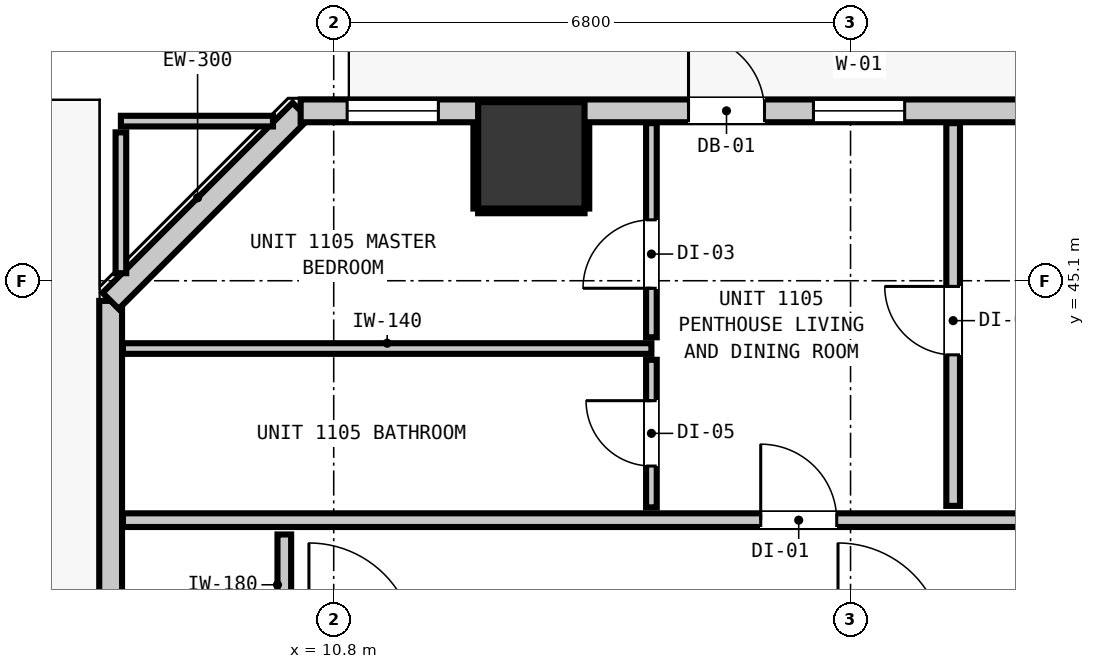
"""IFC4 building model, lengths in metres.
Left out: names, types, materials, properties, quantities, classifications, styles, units other than length and angle.
Written with IfcOpenShell. Run it as: python <this file> out.ifc"""

import sys

from ifc_helpers import new_model, si_unit, direction, frame, frame_2d, origin, origin_2d, place, context, subcontext, project, spatial, rectangle, extrude, element, fill, save


model = new_model("IFC4")
c1 = context("Model", 3, precision=1e-05, world=origin(), true_north=direction((0.0, 1.0)))
c2 = subcontext(c1, "Body", "Model", "MODEL_VIEW")
j1 = project(units=[si_unit("LENGTHUNIT", "METRE"), si_unit("PLANEANGLEUNIT", "RADIAN")], contexts=[c1])
p1 = place(None, origin())
s1 = spatial("IfcSite", under=j1, at=p1, CompositionType="ELEMENT")
p2 = place(p1, origin())
s2 = spatial("IfcBuilding", under=s1, at=p2, CompositionType="ELEMENT")
p3 = place(p2, frame((0.0, 0.0, 41.92)))
s3 = spatial("IfcBuildingStorey", under=s2, at=p3, CompositionType="ELEMENT", Elevation=41.92)
p4 = place(p3, frame((13.4, 46.75, -0.2), z_axis=(0.0, 0.0, 1.0), x_axis=(1.0, 0.0, 0.0)))
e1 = element("IfcColumn", 1, at=p4, inside=s3, PredefinedType="COLUMN", context=c2, shape_type="SweptSolid", body=[
    extrude(rectangle(XDim=1.4, YDim=1.4, at=origin_2d()), origin(), (0.0, 0.0, 1.0), 3.52),
])
p5 = place(p3, frame((7.865, 10.165, 0.0), z_axis=(0.0, 0.0, 1.0), x_axis=(0.0, 1.0, 0.0)))
e2 = element("IfcWall", 2, at=p5, inside=s3, PredefinedType="STANDARD", context=c2, shape_type="SweptSolid", body=[
    extrude(rectangle(XDim=34.67, YDim=0.3, at=frame_2d((17.335, 0.0))), origin(), (0.0, 0.0, 1.0), 3.06),
])
p6 = place(p5, frame((3.302, 0.0, 0.0)))
e3 = element("IfcOpeningElement", 3, at=p6, cuts=e2, PredefinedType="OPENING", context=c2, shape_type="SweptSolid", body=[
    extrude(rectangle(XDim=1.1, YDim=2.15, at=frame_2d((0.55, 1.075))), frame((0.0, 0.16, 0.0), z_axis=(0.0, -1.0, 0.0), x_axis=(1.0, 0.0, 0.0)), (0.0, 0.0, 1.0), 0.32),
])
p7 = place(p3, frame((7.865, 44.835, 0.0), z_axis=(0.0, 0.0, 1.0), x_axis=(0.707106781187, 0.707106781187, 0.0)))
e4 = element("IfcWall", 4, at=p7, inside=s3, PredefinedType="STANDARD", context=c2, shape_type="SweptSolid", body=[
    extrude(rectangle(XDim=3.536, YDim=0.3, at=frame_2d((1.768, 0.0))), origin(), (0.0, 0.0, 1.0), 3.06),
])
p8 = place(p3, frame((10.365, 47.335, 0.0), z_axis=(0.0, 0.0, 1.0), x_axis=(1.0, 0.0, 0.0)))
e5 = element("IfcWall", 5, at=p8, inside=s3, PredefinedType="STANDARD", context=c2, shape_type="SweptSolid", body=[
    extrude(rectangle(XDim=37.47, YDim=0.3, at=frame_2d((18.735, 0.0))), origin(), (0.0, 0.0, 1.0), 3.06),
])
p9 = place(p8, frame((5.103, 0.0, 0.0)))
e6 = element("IfcOpeningElement", 6, at=p9, cuts=e5, PredefinedType="OPENING", context=c2, shape_type="SweptSolid", body=[
    extrude(rectangle(XDim=1.0, YDim=2.15, at=frame_2d((0.5, 1.075))), frame((0.0, 0.16, 0.0), z_axis=(0.0, -1.0, 0.0), x_axis=(1.0, 0.0, 0.0)), (0.0, 0.0, 1.0), 0.32),
])
p10 = place(p8, frame((6.747, 0.0, 0.85)))
e7 = element("IfcOpeningElement", 7, at=p10, cuts=e5, PredefinedType="OPENING", context=c2, shape_type="SweptSolid", body=[
    extrude(rectangle(XDim=1.2, YDim=1.8, at=frame_2d((0.6, 0.9))), frame((0.0, 0.16, 0.0), z_axis=(0.0, -1.0, 0.0), x_axis=(1.0, 0.0, 0.0)), (0.0, 0.0, 1.0), 0.32),
])
p11 = place(p8, frame((0.612, 0.0, 0.85)))
e8 = element("IfcOpeningElement", 8, at=p11, cuts=e5, PredefinedType="OPENING", context=c2, shape_type="SweptSolid", body=[
    extrude(rectangle(XDim=1.2, YDim=1.8, at=frame_2d((0.6, 0.9))), frame((0.0, 0.16, 0.0), z_axis=(0.0, -1.0, 0.0), x_axis=(1.0, 0.0, 0.0)), (0.0, 0.0, 1.0), 0.32),
])
p12 = place(p8, frame((21.345, 0.0, 0.85)))
e9 = element("IfcOpeningElement", 9, at=p12, cuts=e5, PredefinedType="OPENING", context=c2, shape_type="SweptSolid", body=[
    extrude(rectangle(XDim=1.2, YDim=1.8, at=frame_2d((0.6, 0.9))), frame((0.0, 0.16, 0.0), z_axis=(0.0, -1.0, 0.0), x_axis=(1.0, 0.0, 0.0)), (0.0, 0.0, 1.0), 0.32),
])
p13 = place(p8, frame((31.892, 0.0, 0.85)))
e10 = element("IfcOpeningElement", 10, at=p13, cuts=e5, PredefinedType="OPENING", context=c2, shape_type="SweptSolid", body=[
    extrude(rectangle(XDim=1.2, YDim=1.8, at=frame_2d((0.6, 0.9))), frame((0.0, 0.16, 0.0), z_axis=(0.0, -1.0, 0.0), x_axis=(1.0, 0.0, 0.0)), (0.0, 0.0, 1.0), 0.32),
])
p14 = place(p8, frame((27.418, 0.0, 0.85)))
e11 = element("IfcOpeningElement", 11, at=p14, cuts=e5, PredefinedType="OPENING", context=c2, shape_type="SweptSolid", body=[
    extrude(rectangle(XDim=1.2, YDim=1.8, at=frame_2d((0.6, 0.9))), frame((0.0, 0.16, 0.0), z_axis=(0.0, -1.0, 0.0), x_axis=(1.0, 0.0, 0.0)), (0.0, 0.0, 1.0), 0.32),
])
p15 = place(p3, frame((8.027, 41.95, 0.0), z_axis=(0.0, 0.0, 1.0), x_axis=(1.0, 0.0, 0.0)))
e12 = element("IfcWall", 12, at=p15, inside=s3, PredefinedType="PARTITIONING", context=c2, shape_type="SweptSolid", body=[
    extrude(rectangle(XDim=28.905, YDim=0.18, at=frame_2d((14.452, 0.0))), origin(), (0.0, 0.0, 1.0), 3.06),
])
p16 = place(p15, frame((8.391, 0.0, 0.0)))
e13 = element("IfcOpeningElement", 13, at=p16, cuts=e12, PredefinedType="OPENING", context=c2, shape_type="SweptSolid", body=[
    extrude(rectangle(XDim=1.0, YDim=2.15, at=frame_2d((0.5, 1.075))), frame((0.0, 0.1, 0.0), z_axis=(0.0, -1.0, 0.0), x_axis=(1.0, 0.0, 0.0)), (0.0, 0.0, 1.0), 0.2),
])
p17 = place(p15, frame((21.82, 0.0, 0.0)))
e14 = element("IfcOpeningElement", 14, at=p17, cuts=e12, PredefinedType="OPENING", context=c2, shape_type="SweptSolid", body=[
    extrude(rectangle(XDim=1.0, YDim=2.15, at=frame_2d((0.5, 1.075))), frame((0.0, 0.1, 0.0), z_axis=(0.0, -1.0, 0.0), x_axis=(1.0, 0.0, 0.0)), (0.0, 0.0, 1.0), 0.2),
])
p18 = place(p3, frame((8.027, 44.208, 0.0), z_axis=(0.0, 0.0, 1.0), x_axis=(1.0, 0.0, 0.0)))
e15 = element("IfcWall", 15, at=p18, inside=s3, PredefinedType="PARTITIONING", context=c2, shape_type="SweptSolid", body=[
    extrude(rectangle(XDim=6.953, YDim=0.14, at=frame_2d((3.477, 0.0))), origin(), (0.0, 0.0, 1.0), 3.06),
])
p19 = place(p3, frame((8.0, 47.2, 0.0), z_axis=(0.0, 0.0, 1.0), x_axis=(1.0, 0.0, 0.0)))
e16 = element("IfcWall", 16, at=p19, inside=s3, PredefinedType="PARTITIONING", context=c2, shape_type="SweptSolid", body=[
    extrude(rectangle(XDim=2.001, YDim=0.14, at=frame_2d((1.0, 0.0))), origin(), (0.0, 0.0, 1.0), 3.06),
])
p20 = place(p3, frame((10.15, 40.438, 0.0), z_axis=(0.0, 0.0, 1.0), x_axis=(0.0, 1.0, 0.0)))
e17 = element("IfcWall", 17, at=p20, inside=s3, PredefinedType="PARTITIONING", context=c2, shape_type="SweptSolid", body=[
    extrude(rectangle(XDim=1.324, YDim=0.18, at=frame_2d((0.662, 0.0))), origin(), (0.0, 0.0, 1.0), 2.445),
])
p21 = place(p3, frame((18.95, 42.138, 0.0), z_axis=(0.0, 0.0, 1.0), x_axis=(0.0, 1.0, 0.0)))
e18 = element("IfcWall", 18, at=p21, inside=s3, PredefinedType="PARTITIONING", context=c2, shape_type="SweptSolid", body=[
    extrude(rectangle(XDim=5.035, YDim=0.18, at=frame_2d((2.518, 0.0))), origin(), (0.0, 0.0, 1.0), 3.06),
])
p22 = place(p21, frame((1.987, 0.0, 0.0)))
e19 = element("IfcOpeningElement", 19, at=p22, cuts=e18, PredefinedType="OPENING", context=c2, shape_type="SweptSolid", body=[
    extrude(rectangle(XDim=0.9, YDim=2.1, at=frame_2d((0.45, 1.05))), frame((0.0, 0.1, 0.0), z_axis=(0.0, -1.0, 0.0), x_axis=(1.0, 0.0, 0.0)), (0.0, 0.0, 1.0), 0.2),
])
p23 = place(p3, frame((8.0, 45.199, 0.0), z_axis=(0.0, 0.0, 1.0), x_axis=(0.0, 1.0, 0.0)))
e20 = element("IfcWall", 20, at=p23, inside=s3, PredefinedType="PARTITIONING", context=c2, shape_type="SweptSolid", body=[
    extrude(rectangle(XDim=1.853, YDim=0.14, at=frame_2d((0.927, 0.0))), origin(), (0.0, 0.0, 1.0), 3.06),
])
p24 = place(p3, frame((14.98, 42.118, 0.0), z_axis=(0.0, 0.0, 1.0), x_axis=(0.0, 1.0, 0.0)))
e21 = element("IfcWall", 21, at=p24, inside=s3, PredefinedType="PARTITIONING", context=c2, shape_type="SweptSolid", body=[
    extrude(rectangle(XDim=1.942, YDim=0.14, at=frame_2d((0.971, 0.0))), origin(), (0.0, 0.0, 1.0), 3.06),
])
p25 = place(p24, frame((0.544, 0.0, 0.0)))
e22 = element("IfcOpeningElement", 22, at=p25, cuts=e21, PredefinedType="OPENING", context=c2, shape_type="SweptSolid", body=[
    extrude(rectangle(XDim=0.86, YDim=2.02, at=frame_2d((0.43, 1.01))), frame((0.0, 0.08, 0.0), z_axis=(0.0, -1.0, 0.0), x_axis=(1.0, 0.0, 0.0)), (0.0, 0.0, 1.0), 0.16),
])
p26 = place(p3, frame((14.98, 44.356, 0.0), z_axis=(0.0, 0.0, 1.0), x_axis=(0.0, 1.0, 0.0)))
e23 = element("IfcWall", 23, at=p26, inside=s3, PredefinedType="PARTITIONING", context=c2, shape_type="SweptSolid", body=[
    extrude(rectangle(XDim=2.817, YDim=0.14, at=frame_2d((1.409, 0.0))), origin(), (0.0, 0.0, 1.0), 3.06),
])
p27 = place(p26, frame((0.645, 0.0, 0.0)))
e24 = element("IfcOpeningElement", 24, at=p27, cuts=e23, PredefinedType="OPENING", context=c2, shape_type="SweptSolid", body=[
    extrude(rectangle(XDim=0.9, YDim=2.1, at=frame_2d((0.45, 1.05))), frame((0.0, 0.08, 0.0), z_axis=(0.0, -1.0, 0.0), x_axis=(1.0, 0.0, 0.0)), (0.0, 0.0, 1.0), 0.16),
])
p28 = place(p3, frame((12.7, 46.018, 0.0), z_axis=(0.0, 0.0, 1.0), x_axis=(1.0, 0.0, 0.0)))
e25 = element("IfcWall", 25, at=p28, inside=s3, PredefinedType="PARTITIONING", context=c2, shape_type="SweptSolid", body=[
    extrude(rectangle(XDim=1.4, YDim=0.06, at=frame_2d((0.7, 0.0))), origin(), (0.0, 0.0, 1.0), 1.45),
])
for number, where, z_axis, x_axis in (
    (26, (12.668, 46.05, 0.0), (0.0, 0.0, 1.0), (0.0, 1.0, 0.0)),
    (27, (14.132, 46.05, 0.0), (0.0, 0.0, 1.0), (0.0, 1.0, 0.0)),
):
    element("IfcWall", number, at=place(p3, frame(where, z_axis=z_axis, x_axis=x_axis)), inside=s3, PredefinedType="PARTITIONING", context=c2, shape_type="SweptSolid", body=[
        extrude(rectangle(XDim=1.12, YDim=0.06, at=frame_2d((0.56, 0.0))), origin(), (0.0, 0.0, 1.0), 1.45),
    ])
p29 = place(p9, origin())
e28 = element("IfcDoor", 28, at=p29, inside=s3, OperationType="SINGLE_SWING_LEFT", PredefinedType="DOOR", context=c2, shape_type="SweptSolid", body=[
    extrude(rectangle(XDim=1.0, YDim=2.15, at=frame_2d((0.5, 1.075))), frame((0.0, 0.025, 0.0), z_axis=(0.0, -1.0, 0.0), x_axis=(1.0, 0.0, 0.0)), (0.0, 0.0, 1.0), 0.05),
])
fill(e6, e28)
p30 = place(p10, origin())
e29 = element("IfcWindow", 29, at=p30, inside=s3, PartitioningType="SINGLE_PANEL", PredefinedType="WINDOW", context=c2, shape_type="SweptSolid", body=[
    extrude(rectangle(XDim=1.2, YDim=1.8, at=frame_2d((0.6, 0.9))), frame((0.0, 0.03, 0.0), z_axis=(0.0, -1.0, 0.0), x_axis=(1.0, 0.0, 0.0)), (0.0, 0.0, 1.0), 0.06),
])
fill(e7, e29)
p31 = place(p11, origin())
e30 = element("IfcWindow", 30, at=p31, inside=s3, PartitioningType="SINGLE_PANEL", PredefinedType="WINDOW", context=c2, shape_type="SweptSolid", body=[
    extrude(rectangle(XDim=1.2, YDim=1.8, at=frame_2d((0.6, 0.9))), frame((0.0, 0.03, 0.0), z_axis=(0.0, -1.0, 0.0), x_axis=(1.0, 0.0, 0.0)), (0.0, 0.0, 1.0), 0.06),
])
fill(e8, e30)
p32 = place(p16, origin())
e31 = element("IfcDoor", 31, at=p32, inside=s3, OperationType="SINGLE_SWING_LEFT", PredefinedType="DOOR", context=c2, shape_type="SweptSolid", body=[
    extrude(rectangle(XDim=1.0, YDim=2.15, at=frame_2d((0.5, 1.075))), frame((0.0, 0.025, 0.0), z_axis=(0.0, -1.0, 0.0), x_axis=(1.0, 0.0, 0.0)), (0.0, 0.0, 1.0), 0.05),
])
fill(e13, e31)
p33 = place(p25, origin())
e32 = element("IfcDoor", 32, at=p33, inside=s3, OperationType="SINGLE_SWING_RIGHT", PredefinedType="DOOR", context=c2, shape_type="SweptSolid", body=[
    extrude(rectangle(XDim=0.86, YDim=2.02, at=frame_2d((0.43, 1.01))), frame((0.0, 0.025, 0.0), z_axis=(0.0, -1.0, 0.0), x_axis=(1.0, 0.0, 0.0)), (0.0, 0.0, 1.0), 0.05),
])
fill(e22, e32)
p34 = place(p27, origin())
e33 = element("IfcDoor", 33, at=p34, inside=s3, OperationType="SINGLE_SWING_LEFT", PredefinedType="DOOR", context=c2, shape_type="SweptSolid", body=[
    extrude(rectangle(XDim=0.9, YDim=2.1, at=frame_2d((0.45, 1.05))), frame((0.0, 0.025, 0.0), z_axis=(0.0, -1.0, 0.0), x_axis=(1.0, 0.0, 0.0)), (0.0, 0.0, 1.0), 0.05),
])
fill(e24, e33)
p35 = place(p22, origin())
e34 = element("IfcDoor", 34, at=p35, inside=s3, OperationType="SINGLE_SWING_RIGHT", PredefinedType="DOOR", context=c2, shape_type="SweptSolid", body=[
    extrude(rectangle(XDim=0.9, YDim=2.1, at=frame_2d((0.45, 1.05))), frame((0.0, 0.025, 0.0), z_axis=(0.0, -1.0, 0.0), x_axis=(1.0, 0.0, 0.0)), (0.0, 0.0, 1.0), 0.05),
])
fill(e19, e34)
save(model, sys.argv[1])
